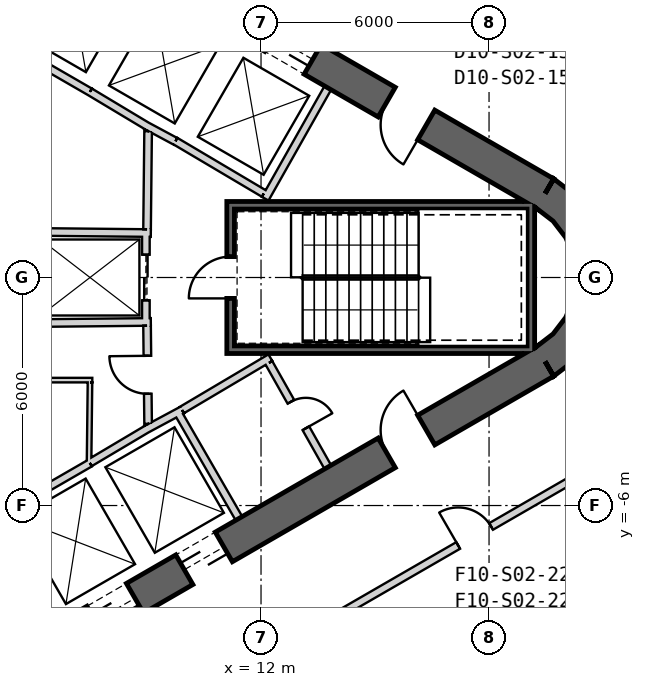
"""IFC4 building model, lengths in metres.
Left out: names, types, materials, properties, quantities, classifications, styles, units other than length and angle.
Written with IfcOpenShell. Run it as: python <this file> out.ifc"""

import sys

from ifc_helpers import new_model, si_unit, direction, frame, frame_2d, origin, place, context, subcontext, project, spatial, polyline, rectangle, outline, extrude, element, fill, save


model = new_model("IFC4")
c1 = context("Model", 3, precision=1e-05, world=origin(), true_north=direction((0.0, 1.0)))
c2 = subcontext(c1, "Body", "Model", "MODEL_VIEW")
j1 = project(units=[si_unit("LENGTHUNIT", "METRE"), si_unit("PLANEANGLEUNIT", "RADIAN")], contexts=[c1])
p1 = place(None, origin())
s1 = spatial("IfcSite", under=j1, at=p1, CompositionType="ELEMENT")
p2 = place(p1, origin())
s2 = spatial("IfcBuilding", under=s1, at=p2, CompositionType="ELEMENT")
p3 = place(p2, frame((0.0, 0.0, 70.1)))
s3 = spatial("IfcBuildingStorey", under=s2, at=p3, CompositionType="ELEMENT", Elevation=70.1)
p4 = place(p3, frame((19.475, 2.208, 0.0), z_axis=(0.0, 0.0, 1.0), x_axis=(-0.866028369851, 0.499994862586, 0.0)))
e1 = element("IfcWall", 1, at=p4, inside=s3, PredefinedType="SHEAR", context=c2, shape_type="SweptSolid", body=[
    extrude(rectangle(XDim=31.523, YDim=0.9, at=frame_2d((15.762, 0.0))), origin(), (0.0, 0.0, 1.0), 4.1),
])
p5 = place(p4, frame((7.062, 0.0, 0.0)))
e2 = element("IfcOpeningElement", 2, at=p5, cuts=e1, PredefinedType="OPENING", context=c2, shape_type="SweptSolid", body=[
    extrude(rectangle(XDim=1.2, YDim=2.4, at=frame_2d((0.6, 1.2))), frame((0.0, 0.46, 0.0), z_axis=(0.0, -1.0, 0.0), x_axis=(1.0, 0.0, 0.0)), (0.0, 0.0, 1.0), 0.92),
])
p6 = place(p4, frame((9.762, 0.0, 0.0)))
e3 = element("IfcOpeningElement", 3, at=p6, cuts=e1, PredefinedType="OPENING", context=c2, shape_type="SweptSolid", body=[
    extrude(rectangle(XDim=1.2, YDim=2.4, at=frame_2d((0.6, 1.2))), frame((0.0, 0.46, 0.0), z_axis=(0.0, -1.0, 0.0), x_axis=(1.0, 0.0, 0.0)), (0.0, 0.0, 1.0), 0.92),
])
p7 = place(p4, frame((12.462, 0.0, 0.0)))
e4 = element("IfcOpeningElement", 4, at=p7, cuts=e1, PredefinedType="OPENING", context=c2, shape_type="SweptSolid", body=[
    extrude(rectangle(XDim=1.2, YDim=2.4, at=frame_2d((0.6, 1.2))), frame((0.0, 0.46, 0.0), z_axis=(0.0, -1.0, 0.0), x_axis=(1.0, 0.0, 0.0)), (0.0, 0.0, 1.0), 0.92),
])
p8 = place(p4, frame((15.162, 0.0, 0.0)))
e5 = element("IfcOpeningElement", 5, at=p8, cuts=e1, PredefinedType="OPENING", context=c2, shape_type="SweptSolid", body=[
    extrude(rectangle(XDim=1.2, YDim=2.4, at=frame_2d((0.6, 1.2))), frame((0.0, 0.46, 0.0), z_axis=(0.0, -1.0, 0.0), x_axis=(1.0, 0.0, 0.0)), (0.0, 0.0, 1.0), 0.92),
])
p9 = place(p4, frame((17.862, 0.0, 0.0)))
e6 = element("IfcOpeningElement", 6, at=p9, cuts=e1, PredefinedType="OPENING", context=c2, shape_type="SweptSolid", body=[
    extrude(rectangle(XDim=1.2, YDim=2.4, at=frame_2d((0.6, 1.2))), frame((0.0, 0.46, 0.0), z_axis=(0.0, -1.0, 0.0), x_axis=(1.0, 0.0, 0.0)), (0.0, 0.0, 1.0), 0.92),
])
p10 = place(p4, frame((20.562, 0.0, 0.0)))
e7 = element("IfcOpeningElement", 7, at=p10, cuts=e1, PredefinedType="OPENING", context=c2, shape_type="SweptSolid", body=[
    extrude(rectangle(XDim=1.2, YDim=2.4, at=frame_2d((0.6, 1.2))), frame((0.0, 0.46, 0.0), z_axis=(0.0, -1.0, 0.0), x_axis=(1.0, 0.0, 0.0)), (0.0, 0.0, 1.0), 0.92),
])
p11 = place(p4, frame((23.262, 0.0, 0.0)))
e8 = element("IfcOpeningElement", 8, at=p11, cuts=e1, PredefinedType="OPENING", context=c2, shape_type="SweptSolid", body=[
    extrude(rectangle(XDim=1.2, YDim=2.4, at=frame_2d((0.6, 1.2))), frame((0.0, 0.46, 0.0), z_axis=(0.0, -1.0, 0.0), x_axis=(1.0, 0.0, 0.0)), (0.0, 0.0, 1.0), 0.92),
])
p12 = place(p4, frame((3.612, 0.0, 0.0)))
e9 = element("IfcOpeningElement", 9, at=p12, cuts=e1, PredefinedType="OPENING", context=c2, shape_type="SweptSolid", body=[
    extrude(rectangle(XDim=1.2, YDim=2.4, at=frame_2d((0.6, 1.2))), frame((0.0, 0.46, 0.0), z_axis=(0.0, -1.0, 0.0), x_axis=(1.0, 0.0, 0.0)), (0.0, 0.0, 1.0), 0.92),
])
p13 = place(p4, frame((26.712, 0.0, 0.0)))
e10 = element("IfcOpeningElement", 10, at=p13, cuts=e1, PredefinedType="OPENING", context=c2, shape_type="SweptSolid", body=[
    extrude(rectangle(XDim=1.2, YDim=2.4, at=frame_2d((0.6, 1.2))), frame((0.0, 0.46, 0.0), z_axis=(0.0, -1.0, 0.0), x_axis=(1.0, 0.0, 0.0)), (0.0, 0.0, 1.0), 0.92),
])
p14 = place(p3, frame((-7.825, -17.97, 0.0), z_axis=(0.0, 0.0, 1.0), x_axis=(0.866028369851, 0.499994862586, 0.0)))
e11 = element("IfcWall", 11, at=p14, inside=s3, PredefinedType="SHEAR", context=c2, shape_type="SweptSolid", body=[
    extrude(rectangle(XDim=31.523, YDim=0.9, at=frame_2d((15.762, 0.0))), origin(), (0.0, 0.0, 1.0), 4.1),
])
p15 = place(p14, frame((7.062, 0.0, 0.0)))
e12 = element("IfcOpeningElement", 12, at=p15, cuts=e11, PredefinedType="OPENING", context=c2, shape_type="SweptSolid", body=[
    extrude(rectangle(XDim=1.2, YDim=2.4, at=frame_2d((0.6, 1.2))), frame((0.0, 0.46, 0.0), z_axis=(0.0, -1.0, 0.0), x_axis=(1.0, 0.0, 0.0)), (0.0, 0.0, 1.0), 0.92),
])
p16 = place(p14, frame((9.762, 0.0, 0.0)))
e13 = element("IfcOpeningElement", 13, at=p16, cuts=e11, PredefinedType="OPENING", context=c2, shape_type="SweptSolid", body=[
    extrude(rectangle(XDim=1.2, YDim=2.4, at=frame_2d((0.6, 1.2))), frame((0.0, 0.46, 0.0), z_axis=(0.0, -1.0, 0.0), x_axis=(1.0, 0.0, 0.0)), (0.0, 0.0, 1.0), 0.92),
])
p17 = place(p14, frame((12.462, 0.0, 0.0)))
e14 = element("IfcOpeningElement", 14, at=p17, cuts=e11, PredefinedType="OPENING", context=c2, shape_type="SweptSolid", body=[
    extrude(rectangle(XDim=1.2, YDim=2.4, at=frame_2d((0.6, 1.2))), frame((0.0, 0.46, 0.0), z_axis=(0.0, -1.0, 0.0), x_axis=(1.0, 0.0, 0.0)), (0.0, 0.0, 1.0), 0.92),
])
p18 = place(p14, frame((15.162, 0.0, 0.0)))
e15 = element("IfcOpeningElement", 15, at=p18, cuts=e11, PredefinedType="OPENING", context=c2, shape_type="SweptSolid", body=[
    extrude(rectangle(XDim=1.2, YDim=2.4, at=frame_2d((0.6, 1.2))), frame((0.0, 0.46, 0.0), z_axis=(0.0, -1.0, 0.0), x_axis=(1.0, 0.0, 0.0)), (0.0, 0.0, 1.0), 0.92),
])
p19 = place(p14, frame((17.862, 0.0, 0.0)))
e16 = element("IfcOpeningElement", 16, at=p19, cuts=e11, PredefinedType="OPENING", context=c2, shape_type="SweptSolid", body=[
    extrude(rectangle(XDim=1.2, YDim=2.4, at=frame_2d((0.6, 1.2))), frame((0.0, 0.46, 0.0), z_axis=(0.0, -1.0, 0.0), x_axis=(1.0, 0.0, 0.0)), (0.0, 0.0, 1.0), 0.92),
])
p20 = place(p14, frame((20.562, 0.0, 0.0)))
e17 = element("IfcOpeningElement", 17, at=p20, cuts=e11, PredefinedType="OPENING", context=c2, shape_type="SweptSolid", body=[
    extrude(rectangle(XDim=1.2, YDim=2.4, at=frame_2d((0.6, 1.2))), frame((0.0, 0.46, 0.0), z_axis=(0.0, -1.0, 0.0), x_axis=(1.0, 0.0, 0.0)), (0.0, 0.0, 1.0), 0.92),
])
p21 = place(p14, frame((26.712, 0.0, 0.0)))
e18 = element("IfcOpeningElement", 18, at=p21, cuts=e11, PredefinedType="OPENING", context=c2, shape_type="SweptSolid", body=[
    extrude(rectangle(XDim=1.2, YDim=2.4, at=frame_2d((0.6, 1.2))), frame((0.0, 0.46, 0.0), z_axis=(0.0, -1.0, 0.0), x_axis=(1.0, 0.0, 0.0)), (0.0, 0.0, 1.0), 0.92),
])
p22 = place(p14, frame((3.612, 0.0, 0.0)))
e19 = element("IfcOpeningElement", 19, at=p22, cuts=e11, PredefinedType="OPENING", context=c2, shape_type="SweptSolid", body=[
    extrude(rectangle(XDim=1.2, YDim=2.4, at=frame_2d((0.6, 1.2))), frame((0.0, 0.46, 0.0), z_axis=(0.0, -1.0, 0.0), x_axis=(1.0, 0.0, 0.0)), (0.0, 0.0, 1.0), 0.92),
])
p23 = place(p3, origin())
e20 = element("IfcWall", 20, at=p23, inside=s3, PredefinedType="SHEAR", context=c2, shape_type="SweptSolid", body=[
    extrude(outline(polyline([(19.7, -2.598), (20.321, -2.121), (20.798, -1.5), (21.098, -0.777), (21.2, 0.0), (21.098, 0.777), (20.798, 1.5), (20.321, 2.121), (19.7, 2.598), (19.25, 1.819), (19.685, 1.485), (20.019, 1.05), (20.229, 0.543), (20.3, 0.0), (20.229, -0.543), (20.019, -1.05), (19.685, -1.485), (19.25, -1.819), (19.7, -2.598)])), origin(), (0.0, 0.0, 1.0), 4.1),
])
p24 = place(p3, frame((7.497, 4.886, 0.0), z_axis=(0.0, 0.0, 1.0), x_axis=(-0.866030989016, 0.499990325971, 0.0)))
e21 = element("IfcWall", 21, at=p24, inside=s3, PredefinedType="PLUMBINGWALL", context=c2, shape_type="SweptSolid", body=[
    extrude(rectangle(XDim=8.1, YDim=0.2, at=frame_2d((4.05, 0.0))), origin(), (0.0, 0.0, 1.0), 3.8),
])
p25 = place(p3, frame((12.11, 2.073, 0.0), z_axis=(0.0, 0.0, 1.0), x_axis=(0.49196600604, 0.870614408852, 0.0)))
e22 = element("IfcWall", 22, at=p25, inside=s3, PredefinedType="PLUMBINGWALL", context=c2, shape_type="SweptSolid", body=[
    extrude(rectangle(XDim=3.35, YDim=0.2, at=frame_2d((1.675, 0.0))), origin(), (0.0, 0.0, 1.0), 3.8),
])
p26 = place(p3, frame((12.073, 2.211, 0.0), z_axis=(0.0, 0.0, 1.0), x_axis=(-0.860438357912, 0.509554542943, 0.0)))
e23 = element("IfcWall", 23, at=p26, inside=s3, PredefinedType="PLUMBINGWALL", context=c2, shape_type="SweptSolid", body=[
    extrude(rectangle(XDim=2.7, YDim=0.2, at=frame_2d((1.35, 0.0))), origin(), (0.0, 0.0, 1.0), 3.8),
])
p27 = place(p3, frame((9.748, 3.583, 0.0), z_axis=(0.0, 0.0, 1.0), x_axis=(-0.880917147855, 0.473270513147, 0.0)))
e24 = element("IfcWall", 24, at=p27, inside=s3, PredefinedType="PLUMBINGWALL", context=c2, shape_type="SweptSolid", body=[
    extrude(rectangle(XDim=0.878, YDim=0.2, at=frame_2d((0.439, 0.0))), origin(), (0.0, 0.0, 1.0), 3.8),
])
p28 = place(p3, frame((9.079, 3.937, 0.0), z_axis=(0.0, 0.0, 1.0), x_axis=(-0.857516281273, 0.51445682749, 0.0)))
e25 = element("IfcWall", 25, at=p28, inside=s3, PredefinedType="PLUMBINGWALL", context=c2, shape_type="SweptSolid", body=[
    extrude(rectangle(XDim=1.845, YDim=0.2, at=frame_2d((0.922, 0.0))), origin(), (0.0, 0.0, 1.0), 3.8),
])
p29 = place(p3, frame((0.483, -8.936, 0.0), z_axis=(0.0, 0.0, 1.0), x_axis=(0.866030989016, 0.499990325971, 0.0)))
e26 = element("IfcWall", 26, at=p29, inside=s3, PredefinedType="PLUMBINGWALL", context=c2, shape_type="SweptSolid", body=[
    extrude(rectangle(XDim=8.1, YDim=0.2, at=frame_2d((4.05, 0.0))), origin(), (0.0, 0.0, 1.0), 3.8),
])
p30 = place(p3, frame((9.795, -3.525, 0.0), z_axis=(0.0, 0.0, 1.0), x_axis=(0.499984717929, -0.866034226713, 0.0)))
e27 = element("IfcWall", 27, at=p30, inside=s3, PredefinedType="PLUMBINGWALL", context=c2, shape_type="SweptSolid", body=[
    extrude(rectangle(XDim=3.25, YDim=0.2, at=frame_2d((1.625, 0.0))), origin(), (0.0, 0.0, 1.0), 3.8),
])
p31 = place(p3, frame((8.974, -3.999, 0.0), z_axis=(0.0, 0.0, 1.0), x_axis=(0.880907015104, 0.473289373154, 0.0)))
e28 = element("IfcWall", 28, at=p31, inside=s3, PredefinedType="PLUMBINGWALL", context=c2, shape_type="SweptSolid", body=[
    extrude(rectangle(XDim=1.078, YDim=0.2, at=frame_2d((0.539, 0.0))), origin(), (0.0, 0.0, 1.0), 3.8),
])
p32 = place(p3, frame((7.493, -4.878, 0.0), z_axis=(0.0, 0.0, 1.0), x_axis=(0.859981807212, 0.510324691999, 0.0)))
e29 = element("IfcWall", 29, at=p32, inside=s3, PredefinedType="PLUMBINGWALL", context=c2, shape_type="SweptSolid", body=[
    extrude(rectangle(XDim=1.845, YDim=0.2, at=frame_2d((0.922, 0.0))), origin(), (0.0, 0.0, 1.0), 3.8),
])
p33 = place(p3, frame((19.2, 1.9, -0.3), z_axis=(0.0, 0.0, 1.0), x_axis=(-1.0, 0.0, 0.0)))
e30 = element("IfcWall", 30, at=p33, inside=s3, PredefinedType="SHEAR", context=c2, shape_type="SweptSolid", body=[
    extrude(rectangle(XDim=8.1, YDim=0.2, at=frame_2d((4.05, 0.0))), origin(), (0.0, 0.0, 1.0), 4.1),
])
p34 = place(p3, frame((19.1, -2.0, -0.3), z_axis=(0.0, 0.0, 1.0), x_axis=(0.0, 1.0, 0.0)))
e31 = element("IfcWall", 31, at=p34, inside=s3, PredefinedType="SHEAR", context=c2, shape_type="SweptSolid", body=[
    extrude(rectangle(XDim=3.8, YDim=0.2, at=frame_2d((1.9, 0.0))), origin(), (0.0, 0.0, 1.0), 4.1),
])
p35 = place(p3, frame((11.1, -1.9, -0.3), z_axis=(0.0, 0.0, 1.0), x_axis=(1.0, 0.0, 0.0)))
e32 = element("IfcWall", 32, at=p35, inside=s3, PredefinedType="SHEAR", context=c2, shape_type="SweptSolid", body=[
    extrude(rectangle(XDim=7.9, YDim=0.2, at=frame_2d((3.95, 0.0))), origin(), (0.0, 0.0, 1.0), 4.1),
])
p36 = place(p3, frame((11.2, -1.8, -0.3), z_axis=(0.0, 0.0, 1.0), x_axis=(0.0, 1.0, 0.0)))
e33 = element("IfcWall", 33, at=p36, inside=s3, PredefinedType="SHEAR", context=c2, shape_type="SweptSolid", body=[
    extrude(rectangle(XDim=3.6, YDim=0.2, at=frame_2d((1.8, 0.0))), origin(), (0.0, 0.0, 1.0), 4.1),
])
p37 = place(p36, frame((1.25, 0.0, 0.3)))
e34 = element("IfcOpeningElement", 34, at=p37, cuts=e33, PredefinedType="OPENING", context=c2, shape_type="SweptSolid", body=[
    extrude(rectangle(XDim=1.1, YDim=2.1, at=frame_2d((0.55, 1.05))), frame((0.0, 0.11, 0.0), z_axis=(0.0, -1.0, 0.0), x_axis=(1.0, 0.0, 0.0)), (0.0, 0.0, 1.0), 0.22),
])
p38 = place(p3, frame((8.97, 1.2, 0.0), z_axis=(0.0, 0.0, 1.0), x_axis=(0.0, -1.0, 0.0)))
e35 = element("IfcWall", 35, at=p38, inside=s3, PredefinedType="PLUMBINGWALL", context=c2, shape_type="SweptSolid", body=[
    extrude(rectangle(XDim=2.4, YDim=0.2, at=frame_2d((1.2, 0.0))), origin(), (0.0, 0.0, 1.0), 3.8),
])
p39 = place(p38, frame((0.6, 0.0, 0.0)))
e36 = element("IfcOpeningElement", 36, at=p39, cuts=e35, PredefinedType="OPENING", context=c2, shape_type="SweptSolid", body=[
    extrude(rectangle(XDim=1.2, YDim=2.4, at=frame_2d((0.6, 1.2))), frame((0.0, 0.11, 0.0), z_axis=(0.0, -1.0, 0.0), x_axis=(1.0, 0.0, 0.0)), (0.0, 0.0, 1.0), 0.22),
])
p40 = place(p3, frame((6.0, 1.2, 0.0), z_axis=(0.0, 0.0, 1.0), x_axis=(0.999949988, -0.010001074852, 0.0)))
e37 = element("IfcWall", 37, at=p40, inside=s3, PredefinedType="PLUMBINGWALL", context=c2, shape_type="SweptSolid", body=[
    extrude(rectangle(XDim=3.1, YDim=0.2, at=frame_2d((1.55, 0.0))), origin(), (0.0, 0.0, 1.0), 3.8),
])
p41 = place(p3, frame((5.9, -1.201, 0.0), z_axis=(0.0, 0.0, 1.0), x_axis=(0.999950064753, 0.009993397809, 0.0)))
e38 = element("IfcWall", 38, at=p41, inside=s3, PredefinedType="PLUMBINGWALL", context=c2, shape_type="SweptSolid", body=[
    extrude(rectangle(XDim=3.2, YDim=0.2, at=frame_2d((1.6, 0.0))), origin(), (0.0, 0.0, 1.0), 3.8),
])
p42 = place(p3, frame((12.245, -2.109, 0.0), z_axis=(0.0, 0.0, 1.0), x_axis=(-0.860414880418, -0.509594185166, 0.0)))
e39 = element("IfcWall", 39, at=p42, inside=s3, PredefinedType="PARTITIONING", context=c2, shape_type="SweptSolid", body=[
    extrude(rectangle(XDim=2.7, YDim=0.2, at=frame_2d((1.35, 0.0))), origin(), (0.0, 0.0, 1.0), 3.8),
])
p43 = place(p3, frame((13.758, -4.99, 0.0), z_axis=(0.0, 0.0, 1.0), x_axis=(-0.491993409184, 0.87059892334, 0.0)))
e40 = element("IfcWall", 40, at=p43, inside=s3, PredefinedType="PARTITIONING", context=c2, shape_type="SweptSolid", body=[
    extrude(rectangle(XDim=3.15, YDim=0.2, at=frame_2d((1.575, 0.0))), origin(), (0.0, 0.0, 1.0), 3.8),
])
p44 = place(p43, frame((1.175, 0.0, 0.0)))
e41 = element("IfcOpeningElement", 41, at=p44, cuts=e40, PredefinedType="OPENING", context=c2, shape_type="SweptSolid", body=[
    extrude(rectangle(XDim=0.8, YDim=2.1, at=frame_2d((0.4, 1.05))), frame((0.0, 0.11, 0.0), z_axis=(0.0, -1.0, 0.0), x_axis=(1.0, 0.0, 0.0)), (0.0, 0.0, 1.0), 0.22),
])
p45 = place(p3, frame((9.001, 1.27, 0.0), z_axis=(0.0, 0.0, 1.0), x_axis=(0.010784614026, 0.999941844359, 0.0)))
e42 = element("IfcWall", 42, at=p45, inside=s3, PredefinedType="PARTITIONING", context=c2, shape_type="SweptSolid", body=[
    extrude(rectangle(XDim=2.581, YDim=0.2, at=frame_2d((1.291, 0.0))), origin(), (0.0, 0.0, 1.0), 3.8),
])
p46 = place(p3, frame((9.029, -3.851, 0.0), z_axis=(0.0, 0.0, 1.0), x_axis=(-0.010783593937, 0.99994185536, 0.0)))
e43 = element("IfcWall", 43, at=p46, inside=s3, PredefinedType="PARTITIONING", context=c2, shape_type="SweptSolid", body=[
    extrude(rectangle(XDim=2.581, YDim=0.2, at=frame_2d((1.291, 0.0))), origin(), (0.0, 0.0, 1.0), 3.8),
])
p47 = place(p46, frame((0.791, 0.0, 0.0)))
e44 = element("IfcOpeningElement", 44, at=p47, cuts=e43, PredefinedType="OPENING", context=c2, shape_type="SweptSolid", body=[
    extrude(rectangle(XDim=1.0, YDim=2.1, at=frame_2d((0.5, 1.05))), frame((0.0, 0.11, 0.0), z_axis=(0.0, -1.0, 0.0), x_axis=(1.0, 0.0, 0.0)), (0.0, 0.0, 1.0), 0.22),
])
p48 = place(p3, frame((7.56, -2.7, 0.0), z_axis=(0.0, 0.0, 1.0), x_axis=(-1.0, 0.0, 0.0)))
e45 = element("IfcWall", 45, at=p48, inside=s3, PredefinedType="PARTITIONING", context=c2, shape_type="SweptSolid", body=[
    extrude(rectangle(XDim=3.0, YDim=0.12, at=frame_2d((1.5, 0.0))), origin(), (0.0, 0.0, 1.0), 3.8),
])
p49 = place(p3, frame((7.475, -4.865, 0.0), z_axis=(0.0, 0.0, 1.0), x_axis=(0.011716133148, 0.999931363757, 0.0)))
e46 = element("IfcWall", 46, at=p49, inside=s3, PredefinedType="PARTITIONING", context=c2, shape_type="SweptSolid", body=[
    extrude(rectangle(XDim=2.105, YDim=0.12, at=frame_2d((1.052, 0.0))), origin(), (0.0, 0.0, 1.0), 3.8),
])
p50 = place(p3, frame((13.862, -8.971, 0.0), z_axis=(0.0, 0.0, 1.0), x_axis=(0.866032891431, 0.499987030792, 0.0)))
e47 = element("IfcWall", 47, at=p50, inside=s3, PredefinedType="PARTITIONING", context=c2, shape_type="SweptSolid", body=[
    extrude(rectangle(XDim=8.68, YDim=0.2, at=frame_2d((4.34, 0.0))), origin(), (0.0, 0.0, 1.0), 2.98),
])
p51 = place(p50, frame((3.84, 0.0, 0.0)))
e48 = element("IfcOpeningElement", 48, at=p51, cuts=e47, PredefinedType="OPENING", context=c2, shape_type="SweptSolid", body=[
    extrude(rectangle(XDim=1.0, YDim=2.1, at=frame_2d((0.5, 1.05))), frame((0.0, 0.11, 0.0), z_axis=(0.0, -1.0, 0.0), x_axis=(1.0, 0.0, 0.0)), (0.0, 0.0, 1.0), 0.22),
])
p52 = place(p37, origin())
e49 = element("IfcDoor", 49, at=p52, inside=s3, OperationType="SINGLE_SWING_LEFT", PredefinedType="USERDEFINED", context=c2, shape_type="SweptSolid", body=[
    extrude(rectangle(XDim=1.1, YDim=2.1, at=frame_2d((0.55, 1.05))), frame((0.0, 0.025, 0.0), z_axis=(0.0, -1.0, 0.0), x_axis=(1.0, 0.0, 0.0)), (0.0, 0.0, 1.0), 0.05),
])
fill(e34, e49)
p53 = place(p47, origin())
e50 = element("IfcDoor", 50, at=p53, inside=s3, OperationType="SINGLE_SWING_RIGHT", PredefinedType="USERDEFINED", context=c2, shape_type="SweptSolid", body=[
    extrude(rectangle(XDim=1.0, YDim=2.1, at=frame_2d((0.5, 1.05))), frame((0.0, 0.025, 0.0), z_axis=(0.0, -1.0, 0.0), x_axis=(1.0, 0.0, 0.0)), (0.0, 0.0, 1.0), 0.05),
])
fill(e44, e50)
p54 = place(p39, origin())
e51 = element("IfcDoor", 51, at=p54, inside=s3, OperationType="SLIDING_TO_LEFT", PredefinedType="USERDEFINED", context=c2, shape_type="SweptSolid", body=[
    extrude(rectangle(XDim=1.2, YDim=2.4, at=frame_2d((0.6, 1.2))), frame((0.0, 0.025, 0.0), z_axis=(0.0, -1.0, 0.0), x_axis=(1.0, 0.0, 0.0)), (0.0, 0.0, 1.0), 0.05),
])
fill(e36, e51)
p55 = place(p44, origin())
e52 = element("IfcDoor", 52, at=p55, inside=s3, OperationType="SINGLE_SWING_RIGHT", PredefinedType="USERDEFINED", context=c2, shape_type="SweptSolid", body=[
    extrude(rectangle(XDim=0.8, YDim=2.1, at=frame_2d((0.4, 1.05))), frame((0.0, 0.025, 0.0), z_axis=(0.0, -1.0, 0.0), x_axis=(1.0, 0.0, 0.0)), (0.0, 0.0, 1.0), 0.05),
])
fill(e41, e52)
p56 = place(p51, origin())
e53 = element("IfcDoor", 53, at=p56, inside=s3, OperationType="SINGLE_SWING_RIGHT", PredefinedType="USERDEFINED", context=c2, shape_type="SweptSolid", body=[
    extrude(rectangle(XDim=1.0, YDim=2.1, at=frame_2d((0.5, 1.05))), frame((0.0, 0.025, 0.0), z_axis=(0.0, -1.0, 0.0), x_axis=(1.0, 0.0, 0.0)), (0.0, 0.0, 1.0), 0.05),
])
fill(e48, e53)
p57 = place(p5, origin())
e54 = element("IfcDoor", 54, at=p57, inside=s3, OperationType="SLIDING_TO_LEFT", PredefinedType="USERDEFINED", context=c2, shape_type="SweptSolid", body=[
    extrude(rectangle(XDim=1.2, YDim=2.4, at=frame_2d((0.6, 1.2))), frame((0.0, 0.025, 0.0), z_axis=(0.0, -1.0, 0.0), x_axis=(1.0, 0.0, 0.0)), (0.0, 0.0, 1.0), 0.05),
])
fill(e2, e54)
p58 = place(p19, origin())
e55 = element("IfcDoor", 55, at=p58, inside=s3, OperationType="SLIDING_TO_LEFT", PredefinedType="USERDEFINED", context=c2, shape_type="SweptSolid", body=[
    extrude(rectangle(XDim=1.2, YDim=2.4, at=frame_2d((0.6, 1.2))), frame((0.0, 0.025, 0.0), z_axis=(0.0, -1.0, 0.0), x_axis=(1.0, 0.0, 0.0)), (0.0, 0.0, 1.0), 0.05),
])
fill(e16, e55)
p59 = place(p20, origin())
e56 = element("IfcDoor", 56, at=p59, inside=s3, OperationType="SLIDING_TO_LEFT", PredefinedType="USERDEFINED", context=c2, shape_type="SweptSolid", body=[
    extrude(rectangle(XDim=1.2, YDim=2.4, at=frame_2d((0.6, 1.2))), frame((0.0, 0.025, 0.0), z_axis=(0.0, -1.0, 0.0), x_axis=(1.0, 0.0, 0.0)), (0.0, 0.0, 1.0), 0.05),
])
fill(e17, e56)
p60 = place(p21, origin())
e57 = element("IfcDoor", 57, at=p60, inside=s3, OperationType="SINGLE_SWING_RIGHT", PredefinedType="USERDEFINED", context=c2, shape_type="SweptSolid", body=[
    extrude(rectangle(XDim=1.2, YDim=2.4, at=frame_2d((0.6, 1.2))), frame((0.0, 0.025, 0.0), z_axis=(0.0, -1.0, 0.0), x_axis=(1.0, 0.0, 0.0)), (0.0, 0.0, 1.0), 0.05),
])
fill(e18, e57)
p61 = place(p12, origin())
e58 = element("IfcDoor", 58, at=p61, inside=s3, OperationType="SINGLE_SWING_LEFT", PredefinedType="USERDEFINED", context=c2, shape_type="SweptSolid", body=[
    extrude(rectangle(XDim=1.2, YDim=2.4, at=frame_2d((0.6, 1.2))), frame((0.0, 0.025, 0.0), z_axis=(0.0, -1.0, 0.0), x_axis=(1.0, 0.0, 0.0)), (0.0, 0.0, 1.0), 0.05),
])
fill(e9, e58)
save(model, sys.argv[1])
